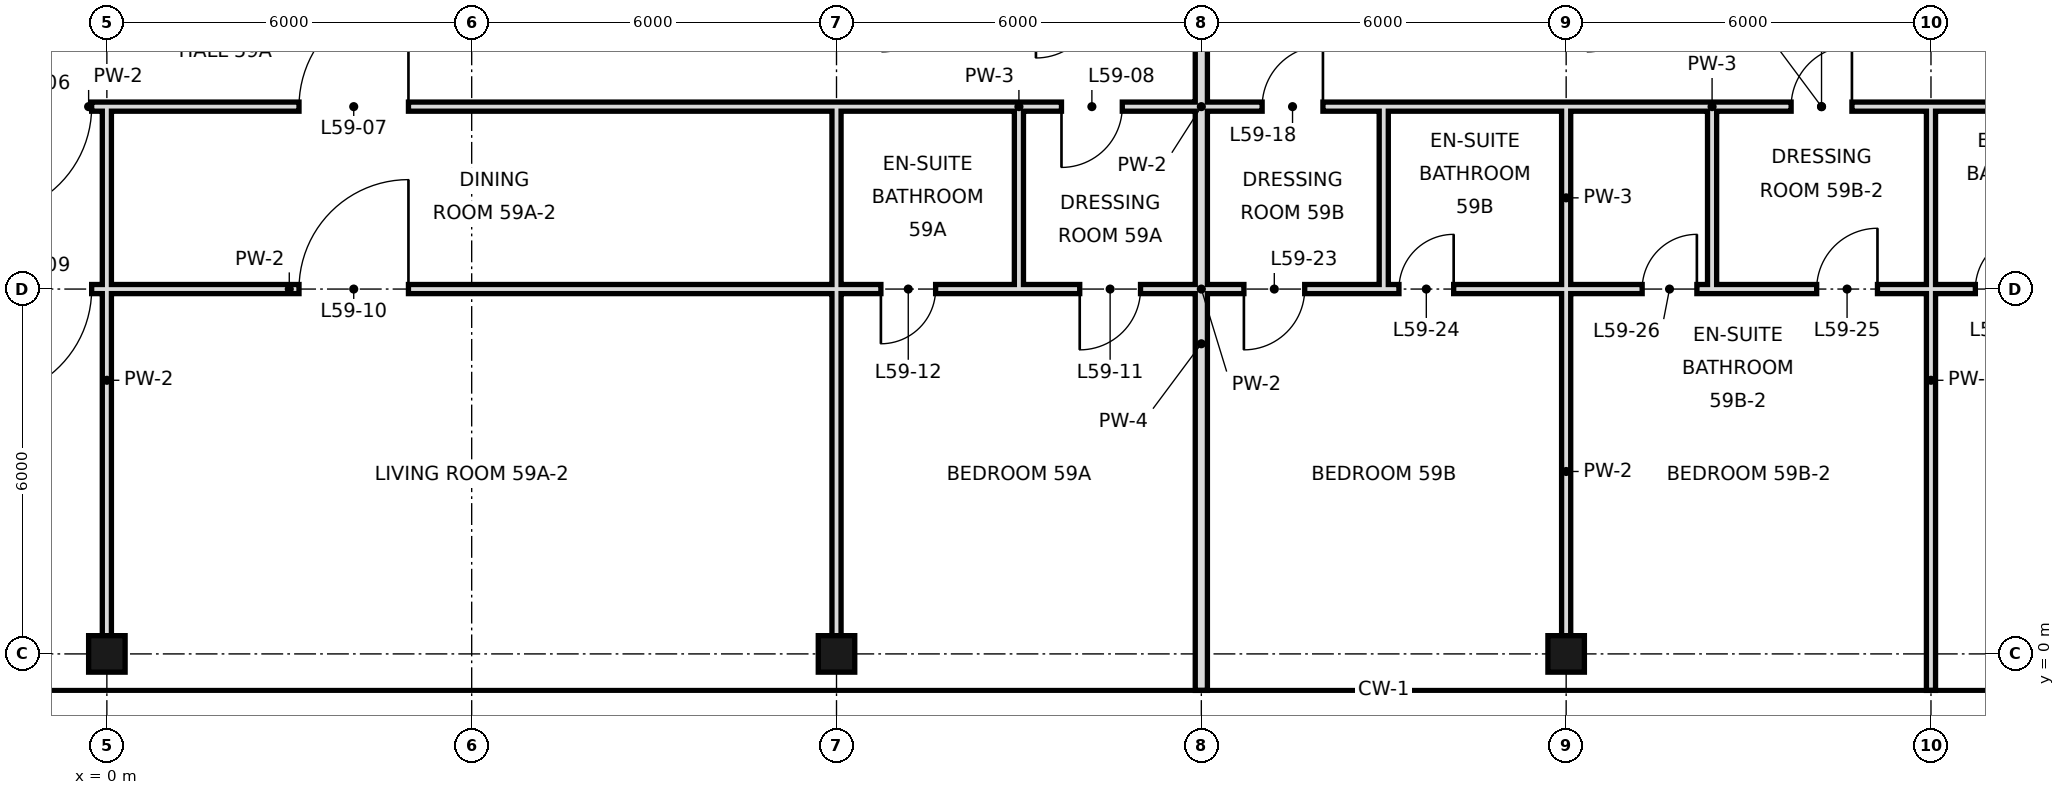
"""IFC4 building model, lengths in metres.
Left out: names, types, materials, properties, quantities, classifications, styles, units other than length and angle.
Written with IfcOpenShell. Run it as: python <this file> out.ifc"""

import sys

from ifc_helpers import new_model, si_unit, direction, frame, frame_2d, origin, origin_2d, place, context, subcontext, project, spatial, rectangle, hollow_rectangle, extrude, element, fill, save


model = new_model("IFC4")
c1 = context("Model", 3, precision=1e-05, world=origin(), true_north=direction((0.0, 1.0)))
c2 = subcontext(c1, "Body", "Model", "MODEL_VIEW")
j1 = project(units=[si_unit("LENGTHUNIT", "METRE"), si_unit("PLANEANGLEUNIT", "RADIAN")], contexts=[c1])
p1 = place(None, origin())
s1 = spatial("IfcSite", under=j1, at=p1, CompositionType="ELEMENT")
p2 = place(p1, origin())
s2 = spatial("IfcBuilding", under=s1, at=p2, CompositionType="ELEMENT")
p3 = place(p2, frame((0.0, 0.0, 250.4)))
s3 = spatial("IfcBuildingStorey", under=s2, at=p3, CompositionType="ELEMENT", Elevation=250.4)
for number, where, z_axis, x_axis in (
    (1, (0.0, 0.0, 0.0), (0.0, 0.0, 1.0), (1.0, 0.0, 0.0)),
    (2, (12.0, 0.0, 0.0), (0.0, 0.0, 1.0), (1.0, 0.0, 0.0)),
    (3, (24.0, 0.0, 0.0), (0.0, 0.0, 1.0), (1.0, 0.0, 0.0)),
):
    element("IfcColumn", number, at=place(p3, frame(where, z_axis=z_axis, x_axis=x_axis)), inside=s3, PredefinedType="COLUMN", context=c2, shape_type="SweptSolid", body=[
        extrude(hollow_rectangle(XDim=0.6, YDim=0.6, WallThickness=0.028, at=origin_2d()), origin(), (0.0, 0.0, 1.0), 3.6),
    ])
p4 = place(p3, frame((0.0, 0.0, 0.0), z_axis=(0.0, 0.0, 1.0), x_axis=(0.0, 1.0, 0.0)))
e4 = element("IfcWall", 4, at=p4, inside=s3, PredefinedType="PARTITIONING", context=c2, shape_type="SweptSolid", body=[
    extrude(rectangle(XDim=9.0, YDim=0.15, at=frame_2d((4.5, 0.0))), origin(), (0.0, 0.0, 1.0), 2.72),
])
p5 = place(p3, frame((12.0, 0.0, 0.0), z_axis=(0.0, 0.0, 1.0), x_axis=(0.0, 1.0, 0.0)))
e5 = element("IfcWall", 5, at=p5, inside=s3, PredefinedType="PARTITIONING", context=c2, shape_type="SweptSolid", body=[
    extrude(rectangle(XDim=6.0, YDim=0.15, at=frame_2d((3.0, 0.0))), origin(), (0.0, 0.0, 1.0), 2.72),
])
p6 = place(p3, frame((12.0, 6.0, 0.0), z_axis=(0.0, 0.0, 1.0), x_axis=(0.0, 1.0, 0.0)))
e6 = element("IfcWall", 6, at=p6, inside=s3, PredefinedType="PARTITIONING", context=c2, shape_type="SweptSolid", body=[
    extrude(rectangle(XDim=3.0, YDim=0.15, at=frame_2d((1.5, 0.0))), origin(), (0.0, 0.0, 1.0), 2.72),
])
p7 = place(p3, frame((15.0, 6.0, 0.0), z_axis=(0.0, 0.0, 1.0), x_axis=(0.0, 1.0, 0.0)))
e7 = element("IfcWall", 7, at=p7, inside=s3, PredefinedType="PARTITIONING", context=c2, shape_type="SweptSolid", body=[
    extrude(rectangle(XDim=3.0, YDim=0.15, at=frame_2d((1.5, 0.0))), origin(), (0.0, 0.0, 1.0), 3.42),
])
p8 = place(p3, frame((18.0, -0.6, 0.0), z_axis=(0.0, 0.0, 1.0), x_axis=(0.0, 1.0, 0.0)))
e8 = element("IfcWall", 8, at=p8, inside=s3, PredefinedType="SOLIDWALL", context=c2, shape_type="SweptSolid", body=[
    extrude(rectangle(XDim=11.4, YDim=0.2, at=frame_2d((5.7, 0.0))), origin(), (0.0, 0.0, 1.0), 2.72),
])
p9 = place(p3, frame((21.0, 6.0, 0.0), z_axis=(0.0, 0.0, 1.0), x_axis=(0.0, 1.0, 0.0)))
e9 = element("IfcWall", 9, at=p9, inside=s3, PredefinedType="PARTITIONING", context=c2, shape_type="SweptSolid", body=[
    extrude(rectangle(XDim=3.0, YDim=0.15, at=frame_2d((1.5, 0.0))), origin(), (0.0, 0.0, 1.0), 3.42),
])
p10 = place(p3, frame((24.0, 0.0, 0.0), z_axis=(0.0, 0.0, 1.0), x_axis=(0.0, 1.0, 0.0)))
e10 = element("IfcWall", 10, at=p10, inside=s3, PredefinedType="PARTITIONING", context=c2, shape_type="SweptSolid", body=[
    extrude(rectangle(XDim=6.0, YDim=0.15, at=frame_2d((3.0, 0.0))), origin(), (0.0, 0.0, 1.0), 2.72),
])
p11 = place(p3, frame((24.0, 6.0, 0.0), z_axis=(0.0, 0.0, 1.0), x_axis=(0.0, 1.0, 0.0)))
e11 = element("IfcWall", 11, at=p11, inside=s3, PredefinedType="PARTITIONING", context=c2, shape_type="SweptSolid", body=[
    extrude(rectangle(XDim=3.0, YDim=0.15, at=frame_2d((1.5, 0.0))), origin(), (0.0, 0.0, 1.0), 2.72),
])
p12 = place(p3, frame((26.4, 6.0, 0.0), z_axis=(0.0, 0.0, 1.0), x_axis=(0.0, 1.0, 0.0)))
e12 = element("IfcWall", 12, at=p12, inside=s3, PredefinedType="PARTITIONING", context=c2, shape_type="SweptSolid", body=[
    extrude(rectangle(XDim=3.0, YDim=0.15, at=frame_2d((1.5, 0.0))), origin(), (0.0, 0.0, 1.0), 3.42),
])
p13 = place(p3, frame((30.0, -0.6, 0.0), z_axis=(0.0, 0.0, 1.0), x_axis=(0.0, 1.0, 0.0)))
e13 = element("IfcWall", 13, at=p13, inside=s3, PredefinedType="PARTITIONING", context=c2, shape_type="SweptSolid", body=[
    extrude(rectangle(XDim=6.6, YDim=0.15, at=frame_2d((3.3, 0.0))), origin(), (0.0, 0.0, 1.0), 2.72),
])
p14 = place(p3, frame((30.0, 6.0, 0.0), z_axis=(0.0, 0.0, 1.0), x_axis=(0.0, 1.0, 0.0)))
e14 = element("IfcWall", 14, at=p14, inside=s3, PredefinedType="PARTITIONING", context=c2, shape_type="SweptSolid", body=[
    extrude(rectangle(XDim=3.0, YDim=0.15, at=frame_2d((1.5, 0.0))), origin(), (0.0, 0.0, 1.0), 2.72),
])
p15 = place(p3, frame((-12.0, 6.0, 0.0), z_axis=(0.0, 0.0, 1.0), x_axis=(1.0, 0.0, 0.0)))
e15 = element("IfcWall", 15, at=p15, inside=s3, PredefinedType="PARTITIONING", context=c2, shape_type="SweptSolid", body=[
    extrude(rectangle(XDim=24.0, YDim=0.15, at=frame_2d((12.0, 0.0))), origin(), (0.0, 0.0, 1.0), 2.72),
])
p16 = place(p15, frame((9.95, 0.0, 0.0)))
e16 = element("IfcOpeningElement", 16, at=p16, cuts=e15, PredefinedType="OPENING", context=c2, shape_type="SweptSolid", body=[
    extrude(rectangle(XDim=1.8, YDim=2.4, at=frame_2d((0.9, 1.2))), frame((0.0, 0.085, 0.0), z_axis=(0.0, -1.0, 0.0), x_axis=(1.0, 0.0, 0.0)), (0.0, 0.0, 1.0), 0.17),
])
p17 = place(p15, frame((15.16, 0.0, 0.0)))
e17 = element("IfcOpeningElement", 17, at=p17, cuts=e15, PredefinedType="OPENING", context=c2, shape_type="SweptSolid", body=[
    extrude(rectangle(XDim=1.8, YDim=2.4, at=frame_2d((0.9, 1.2))), frame((0.0, 0.085, 0.0), z_axis=(0.0, -1.0, 0.0), x_axis=(1.0, 0.0, 0.0)), (0.0, 0.0, 1.0), 0.17),
])
p18 = place(p3, frame((15.0, 6.0, 0.0), z_axis=(0.0, 0.0, 1.0), x_axis=(1.0, 0.0, 0.0)))
e18 = element("IfcWall", 18, at=p18, inside=s3, PredefinedType="PARTITIONING", context=c2, shape_type="SweptSolid", body=[
    extrude(rectangle(XDim=6.0, YDim=0.15, at=frame_2d((3.0, 0.0))), origin(), (0.0, 0.0, 1.0), 2.97),
])
p19 = place(p18, frame((1.0, 0.0, 0.0)))
e19 = element("IfcOpeningElement", 19, at=p19, cuts=e18, PredefinedType="OPENING", context=c2, shape_type="SweptSolid", body=[
    extrude(rectangle(XDim=1.0, YDim=2.4, at=frame_2d((0.5, 1.2))), frame((0.0, 0.085, 0.0), z_axis=(0.0, -1.0, 0.0), x_axis=(1.0, 0.0, 0.0)), (0.0, 0.0, 1.0), 0.17),
])
p20 = place(p18, frame((3.7, 0.0, 0.0)))
e20 = element("IfcOpeningElement", 20, at=p20, cuts=e18, PredefinedType="OPENING", context=c2, shape_type="SweptSolid", body=[
    extrude(rectangle(XDim=1.0, YDim=2.4, at=frame_2d((0.5, 1.2))), frame((0.0, 0.085, 0.0), z_axis=(0.0, -1.0, 0.0), x_axis=(1.0, 0.0, 0.0)), (0.0, 0.0, 1.0), 0.17),
])
p21 = place(p3, frame((26.4, 6.0, 0.0), z_axis=(0.0, 0.0, 1.0), x_axis=(1.0, 0.0, 0.0)))
e21 = element("IfcWall", 21, at=p21, inside=s3, PredefinedType="PARTITIONING", context=c2, shape_type="SweptSolid", body=[
    extrude(rectangle(XDim=3.6, YDim=0.15, at=frame_2d((1.8, 0.0))), origin(), (0.0, 0.0, 1.0), 2.97),
])
p22 = place(p21, frame((1.72, 0.0, 0.0)))
e22 = element("IfcOpeningElement", 22, at=p22, cuts=e21, PredefinedType="OPENING", context=c2, shape_type="SweptSolid", body=[
    extrude(rectangle(XDim=1.0, YDim=2.4, at=frame_2d((0.5, 1.2))), frame((0.0, 0.085, 0.0), z_axis=(0.0, -1.0, 0.0), x_axis=(1.0, 0.0, 0.0)), (0.0, 0.0, 1.0), 0.17),
])
p23 = place(p3, frame((12.0, 6.0, 0.0), z_axis=(0.0, 0.0, 1.0), x_axis=(1.0, 0.0, 0.0)))
e23 = element("IfcWall", 23, at=p23, inside=s3, PredefinedType="PARTITIONING", context=c2, shape_type="SweptSolid", body=[
    extrude(rectangle(XDim=3.0, YDim=0.15, at=frame_2d((1.5, 0.0))), origin(), (0.0, 0.0, 1.0), 2.97),
])
p24 = place(p23, frame((0.73, 0.0, 0.0)))
e24 = element("IfcOpeningElement", 24, at=p24, cuts=e23, PredefinedType="OPENING", context=c2, shape_type="SweptSolid", body=[
    extrude(rectangle(XDim=0.9, YDim=2.4, at=frame_2d((0.45, 1.2))), frame((0.0, 0.085, 0.0), z_axis=(0.0, -1.0, 0.0), x_axis=(1.0, 0.0, 0.0)), (0.0, 0.0, 1.0), 0.17),
])
p25 = place(p3, frame((21.0, 6.0, 0.0), z_axis=(0.0, 0.0, 1.0), x_axis=(1.0, 0.0, 0.0)))
e25 = element("IfcWall", 25, at=p25, inside=s3, PredefinedType="PARTITIONING", context=c2, shape_type="SweptSolid", body=[
    extrude(rectangle(XDim=5.4, YDim=0.15, at=frame_2d((2.7, 0.0))), origin(), (0.0, 0.0, 1.0), 2.97),
])
p26 = place(p25, frame((0.25, 0.0, 0.0)))
e26 = element("IfcOpeningElement", 26, at=p26, cuts=e25, PredefinedType="OPENING", context=c2, shape_type="SweptSolid", body=[
    extrude(rectangle(XDim=0.9, YDim=2.4, at=frame_2d((0.45, 1.2))), frame((0.0, 0.085, 0.0), z_axis=(0.0, -1.0, 0.0), x_axis=(1.0, 0.0, 0.0)), (0.0, 0.0, 1.0), 0.17),
])
p27 = place(p25, frame((4.25, 0.0, 0.0)))
e27 = element("IfcOpeningElement", 27, at=p27, cuts=e25, PredefinedType="OPENING", context=c2, shape_type="SweptSolid", body=[
    extrude(rectangle(XDim=0.9, YDim=2.4, at=frame_2d((0.45, 1.2))), frame((0.0, 0.085, 0.0), z_axis=(0.0, -1.0, 0.0), x_axis=(1.0, 0.0, 0.0)), (0.0, 0.0, 1.0), 0.17),
])
p28 = place(p3, frame((30.0, 6.0, 0.0), z_axis=(0.0, 0.0, 1.0), x_axis=(1.0, 0.0, 0.0)))
e28 = element("IfcWall", 28, at=p28, inside=s3, PredefinedType="PARTITIONING", context=c2, shape_type="SweptSolid", body=[
    extrude(rectangle(XDim=3.0, YDim=0.15, at=frame_2d((1.5, 0.0))), origin(), (0.0, 0.0, 1.0), 2.97),
])
p29 = place(p28, frame((0.73, 0.0, 0.0)))
e29 = element("IfcOpeningElement", 29, at=p29, cuts=e28, PredefinedType="OPENING", context=c2, shape_type="SweptSolid", body=[
    extrude(rectangle(XDim=0.9, YDim=2.4, at=frame_2d((0.45, 1.2))), frame((0.0, 0.085, 0.0), z_axis=(0.0, -1.0, 0.0), x_axis=(1.0, 0.0, 0.0)), (0.0, 0.0, 1.0), 0.17),
])
p30 = place(p3, frame((-12.6, 9.0, 0.0), z_axis=(0.0, 0.0, 1.0), x_axis=(1.0, 0.0, 0.0)))
e30 = element("IfcWall", 30, at=p30, inside=s3, PredefinedType="PARTITIONING", context=c2, shape_type="SweptSolid", body=[
    extrude(rectangle(XDim=24.6, YDim=0.15, at=frame_2d((12.3, 0.0))), origin(), (0.0, 0.0, 1.0), 3.42),
])
p31 = place(p30, frame((10.55, 0.0, 0.0)))
e31 = element("IfcOpeningElement", 31, at=p31, cuts=e30, PredefinedType="OPENING", context=c2, shape_type="SweptSolid", body=[
    extrude(rectangle(XDim=1.8, YDim=2.4, at=frame_2d((0.9, 1.2))), frame((0.0, 0.085, 0.0), z_axis=(0.0, -1.0, 0.0), x_axis=(1.0, 0.0, 0.0)), (0.0, 0.0, 1.0), 0.17),
])
p32 = place(p30, frame((15.76, 0.0, 0.0)))
e32 = element("IfcOpeningElement", 32, at=p32, cuts=e30, PredefinedType="OPENING", context=c2, shape_type="SweptSolid", body=[
    extrude(rectangle(XDim=1.8, YDim=2.4, at=frame_2d((0.9, 1.2))), frame((0.0, 0.085, 0.0), z_axis=(0.0, -1.0, 0.0), x_axis=(1.0, 0.0, 0.0)), (0.0, 0.0, 1.0), 0.17),
])
p33 = place(p3, frame((15.0, 9.0, 0.0), z_axis=(0.0, 0.0, 1.0), x_axis=(1.0, 0.0, 0.0)))
e33 = element("IfcWall", 33, at=p33, inside=s3, PredefinedType="PARTITIONING", context=c2, shape_type="SweptSolid", body=[
    extrude(rectangle(XDim=6.0, YDim=0.15, at=frame_2d((3.0, 0.0))), origin(), (0.0, 0.0, 1.0), 3.42),
])
p34 = place(p33, frame((0.7, 0.0, 0.0)))
e34 = element("IfcOpeningElement", 34, at=p34, cuts=e33, PredefinedType="OPENING", context=c2, shape_type="SweptSolid", body=[
    extrude(rectangle(XDim=1.0, YDim=2.4, at=frame_2d((0.5, 1.2))), frame((0.0, 0.085, 0.0), z_axis=(0.0, -1.0, 0.0), x_axis=(1.0, 0.0, 0.0)), (0.0, 0.0, 1.0), 0.17),
])
p35 = place(p33, frame((4.0, 0.0, 0.0)))
e35 = element("IfcOpeningElement", 35, at=p35, cuts=e33, PredefinedType="OPENING", context=c2, shape_type="SweptSolid", body=[
    extrude(rectangle(XDim=1.0, YDim=2.4, at=frame_2d((0.5, 1.2))), frame((0.0, 0.085, 0.0), z_axis=(0.0, -1.0, 0.0), x_axis=(1.0, 0.0, 0.0)), (0.0, 0.0, 1.0), 0.17),
])
p36 = place(p3, frame((26.4, 9.0, 0.0), z_axis=(0.0, 0.0, 1.0), x_axis=(1.0, 0.0, 0.0)))
e36 = element("IfcWall", 36, at=p36, inside=s3, PredefinedType="PARTITIONING", context=c2, shape_type="SweptSolid", body=[
    extrude(rectangle(XDim=3.6, YDim=0.15, at=frame_2d((1.8, 0.0))), origin(), (0.0, 0.0, 1.0), 3.42),
])
p37 = place(p36, frame((1.3, 0.0, 0.0)))
e37 = element("IfcOpeningElement", 37, at=p37, cuts=e36, PredefinedType="OPENING", context=c2, shape_type="SweptSolid", body=[
    extrude(rectangle(XDim=1.0, YDim=2.4, at=frame_2d((0.5, 1.2))), frame((0.0, 0.085, 0.0), z_axis=(0.0, -1.0, 0.0), x_axis=(1.0, 0.0, 0.0)), (0.0, 0.0, 1.0), 0.17),
])
p38 = place(p3, frame((12.0, 9.0, 0.0), z_axis=(0.0, 0.0, 1.0), x_axis=(1.0, 0.0, 0.0)))
e38 = element("IfcWall", 38, at=p38, inside=s3, PredefinedType="PARTITIONING", context=c2, shape_type="SweptSolid", body=[
    extrude(rectangle(XDim=3.0, YDim=0.15, at=frame_2d((1.5, 0.0))), origin(), (0.0, 0.0, 1.0), 3.42),
])
p39 = place(p3, frame((21.0, 9.0, 0.0), z_axis=(0.0, 0.0, 1.0), x_axis=(1.0, 0.0, 0.0)))
e39 = element("IfcWall", 39, at=p39, inside=s3, PredefinedType="PARTITIONING", context=c2, shape_type="SweptSolid", body=[
    extrude(rectangle(XDim=5.4, YDim=0.15, at=frame_2d((2.7, 0.0))), origin(), (0.0, 0.0, 1.0), 3.42),
])
p40 = place(p3, frame((30.0, 9.0, 0.0), z_axis=(0.0, 0.0, 1.0), x_axis=(1.0, 0.0, 0.0)))
e40 = element("IfcWall", 40, at=p40, inside=s3, PredefinedType="PARTITIONING", context=c2, shape_type="SweptSolid", body=[
    extrude(rectangle(XDim=3.0, YDim=0.15, at=frame_2d((1.5, 0.0))), origin(), (0.0, 0.0, 1.0), 3.42),
])
p41 = place(p31, frame((1.8, 0.0, 0.0), z_axis=(0.0, 0.0, 1.0), x_axis=(-1.0, 0.0, 0.0)))
e41 = element("IfcDoor", 41, at=p41, inside=s3, OperationType="SINGLE_SWING_RIGHT", PredefinedType="DOOR", context=c2, shape_type="SweptSolid", body=[
    extrude(rectangle(XDim=1.8, YDim=2.4, at=frame_2d((0.9, 1.2))), frame((0.0, 0.025, 0.0), z_axis=(0.0, -1.0, 0.0), x_axis=(1.0, 0.0, 0.0)), (0.0, 0.0, 1.0), 0.05),
])
fill(e31, e41)
p42 = place(p32, frame((1.8, 0.0, 0.0), z_axis=(0.0, 0.0, 1.0), x_axis=(-1.0, 0.0, 0.0)))
e42 = element("IfcDoor", 42, at=p42, inside=s3, OperationType="SINGLE_SWING_LEFT", PredefinedType="DOOR", context=c2, shape_type="SweptSolid", body=[
    extrude(rectangle(XDim=1.8, YDim=2.4, at=frame_2d((0.9, 1.2))), frame((0.0, 0.025, 0.0), z_axis=(0.0, -1.0, 0.0), x_axis=(1.0, 0.0, 0.0)), (0.0, 0.0, 1.0), 0.05),
])
fill(e32, e42)
p43 = place(p34, frame((1.0, 0.0, 0.0), z_axis=(0.0, 0.0, 1.0), x_axis=(-1.0, 0.0, 0.0)))
e43 = element("IfcDoor", 43, at=p43, inside=s3, OperationType="SINGLE_SWING_RIGHT", PredefinedType="DOOR", context=c2, shape_type="SweptSolid", body=[
    extrude(rectangle(XDim=1.0, YDim=2.4, at=frame_2d((0.5, 1.2))), frame((0.0, 0.025, 0.0), z_axis=(0.0, -1.0, 0.0), x_axis=(1.0, 0.0, 0.0)), (0.0, 0.0, 1.0), 0.05),
])
fill(e34, e43)
p44 = place(p16, frame((1.8, 0.0, 0.0), z_axis=(0.0, 0.0, 1.0), x_axis=(-1.0, 0.0, 0.0)))
e44 = element("IfcDoor", 44, at=p44, inside=s3, OperationType="SINGLE_SWING_RIGHT", PredefinedType="DOOR", context=c2, shape_type="SweptSolid", body=[
    extrude(rectangle(XDim=1.8, YDim=2.4, at=frame_2d((0.9, 1.2))), frame((0.0, 0.025, 0.0), z_axis=(0.0, -1.0, 0.0), x_axis=(1.0, 0.0, 0.0)), (0.0, 0.0, 1.0), 0.05),
])
fill(e16, e44)
p45 = place(p17, frame((1.8, 0.0, 0.0), z_axis=(0.0, 0.0, 1.0), x_axis=(-1.0, 0.0, 0.0)))
e45 = element("IfcDoor", 45, at=p45, inside=s3, OperationType="SINGLE_SWING_LEFT", PredefinedType="DOOR", context=c2, shape_type="SweptSolid", body=[
    extrude(rectangle(XDim=1.8, YDim=2.4, at=frame_2d((0.9, 1.2))), frame((0.0, 0.025, 0.0), z_axis=(0.0, -1.0, 0.0), x_axis=(1.0, 0.0, 0.0)), (0.0, 0.0, 1.0), 0.05),
])
fill(e17, e45)
p46 = place(p19, frame((1.0, 0.0, 0.0), z_axis=(0.0, 0.0, 1.0), x_axis=(-1.0, 0.0, 0.0)))
e46 = element("IfcDoor", 46, at=p46, inside=s3, OperationType="SINGLE_SWING_RIGHT", PredefinedType="DOOR", context=c2, shape_type="SweptSolid", body=[
    extrude(rectangle(XDim=1.0, YDim=2.4, at=frame_2d((0.5, 1.2))), frame((0.0, 0.025, 0.0), z_axis=(0.0, -1.0, 0.0), x_axis=(1.0, 0.0, 0.0)), (0.0, 0.0, 1.0), 0.05),
])
fill(e19, e46)
p47 = place(p24, frame((0.9, 0.0, 0.0), z_axis=(0.0, 0.0, 1.0), x_axis=(-1.0, 0.0, 0.0)))
e47 = element("IfcDoor", 47, at=p47, inside=s3, OperationType="SINGLE_SWING_RIGHT", PredefinedType="DOOR", context=c2, shape_type="SweptSolid", body=[
    extrude(rectangle(XDim=0.9, YDim=2.4, at=frame_2d((0.45, 1.2))), frame((0.0, 0.025, 0.0), z_axis=(0.0, -1.0, 0.0), x_axis=(1.0, 0.0, 0.0)), (0.0, 0.0, 1.0), 0.05),
])
fill(e24, e47)
p48 = place(p35, frame((1.0, 0.0, 0.0), z_axis=(0.0, 0.0, 1.0), x_axis=(-1.0, 0.0, 0.0)))
e48 = element("IfcDoor", 48, at=p48, inside=s3, OperationType="SINGLE_SWING_LEFT", PredefinedType="DOOR", context=c2, shape_type="SweptSolid", body=[
    extrude(rectangle(XDim=1.0, YDim=2.4, at=frame_2d((0.5, 1.2))), frame((0.0, 0.025, 0.0), z_axis=(0.0, -1.0, 0.0), x_axis=(1.0, 0.0, 0.0)), (0.0, 0.0, 1.0), 0.05),
])
fill(e35, e48)
p49 = place(p37, frame((1.0, 0.0, 0.0), z_axis=(0.0, 0.0, 1.0), x_axis=(-1.0, 0.0, 0.0)))
e49 = element("IfcDoor", 49, at=p49, inside=s3, OperationType="SINGLE_SWING_LEFT", PredefinedType="DOOR", context=c2, shape_type="SweptSolid", body=[
    extrude(rectangle(XDim=1.0, YDim=2.4, at=frame_2d((0.5, 1.2))), frame((0.0, 0.025, 0.0), z_axis=(0.0, -1.0, 0.0), x_axis=(1.0, 0.0, 0.0)), (0.0, 0.0, 1.0), 0.05),
])
fill(e37, e49)
p50 = place(p20, frame((1.0, 0.0, 0.0), z_axis=(0.0, 0.0, 1.0), x_axis=(-1.0, 0.0, 0.0)))
e50 = element("IfcDoor", 50, at=p50, inside=s3, OperationType="SINGLE_SWING_RIGHT", PredefinedType="DOOR", context=c2, shape_type="SweptSolid", body=[
    extrude(rectangle(XDim=1.0, YDim=2.4, at=frame_2d((0.5, 1.2))), frame((0.0, 0.025, 0.0), z_axis=(0.0, -1.0, 0.0), x_axis=(1.0, 0.0, 0.0)), (0.0, 0.0, 1.0), 0.05),
])
fill(e20, e50)
p51 = place(p26, frame((0.9, 0.0, 0.0), z_axis=(0.0, 0.0, 1.0), x_axis=(-1.0, 0.0, 0.0)))
e51 = element("IfcDoor", 51, at=p51, inside=s3, OperationType="SINGLE_SWING_LEFT", PredefinedType="DOOR", context=c2, shape_type="SweptSolid", body=[
    extrude(rectangle(XDim=0.9, YDim=2.4, at=frame_2d((0.45, 1.2))), frame((0.0, 0.025, 0.0), z_axis=(0.0, -1.0, 0.0), x_axis=(1.0, 0.0, 0.0)), (0.0, 0.0, 1.0), 0.05),
])
fill(e26, e51)
p52 = place(p22, frame((1.0, 0.0, 0.0), z_axis=(0.0, 0.0, 1.0), x_axis=(-1.0, 0.0, 0.0)))
e52 = element("IfcDoor", 52, at=p52, inside=s3, OperationType="SINGLE_SWING_LEFT", PredefinedType="DOOR", context=c2, shape_type="SweptSolid", body=[
    extrude(rectangle(XDim=1.0, YDim=2.4, at=frame_2d((0.5, 1.2))), frame((0.0, 0.025, 0.0), z_axis=(0.0, -1.0, 0.0), x_axis=(1.0, 0.0, 0.0)), (0.0, 0.0, 1.0), 0.05),
])
fill(e22, e52)
p53 = place(p27, frame((0.9, 0.0, 0.0), z_axis=(0.0, 0.0, 1.0), x_axis=(-1.0, 0.0, 0.0)))
e53 = element("IfcDoor", 53, at=p53, inside=s3, OperationType="SINGLE_SWING_LEFT", PredefinedType="DOOR", context=c2, shape_type="SweptSolid", body=[
    extrude(rectangle(XDim=0.9, YDim=2.4, at=frame_2d((0.45, 1.2))), frame((0.0, 0.025, 0.0), z_axis=(0.0, -1.0, 0.0), x_axis=(1.0, 0.0, 0.0)), (0.0, 0.0, 1.0), 0.05),
])
fill(e27, e53)
p54 = place(p29, frame((0.9, 0.0, 0.0), z_axis=(0.0, 0.0, 1.0), x_axis=(-1.0, 0.0, 0.0)))
e54 = element("IfcDoor", 54, at=p54, inside=s3, OperationType="SINGLE_SWING_LEFT", PredefinedType="DOOR", context=c2, shape_type="SweptSolid", body=[
    extrude(rectangle(XDim=0.9, YDim=2.4, at=frame_2d((0.45, 1.2))), frame((0.0, 0.025, 0.0), z_axis=(0.0, -1.0, 0.0), x_axis=(1.0, 0.0, 0.0)), (0.0, 0.0, 1.0), 0.05),
])
fill(e29, e54)
save(model, sys.argv[1])
